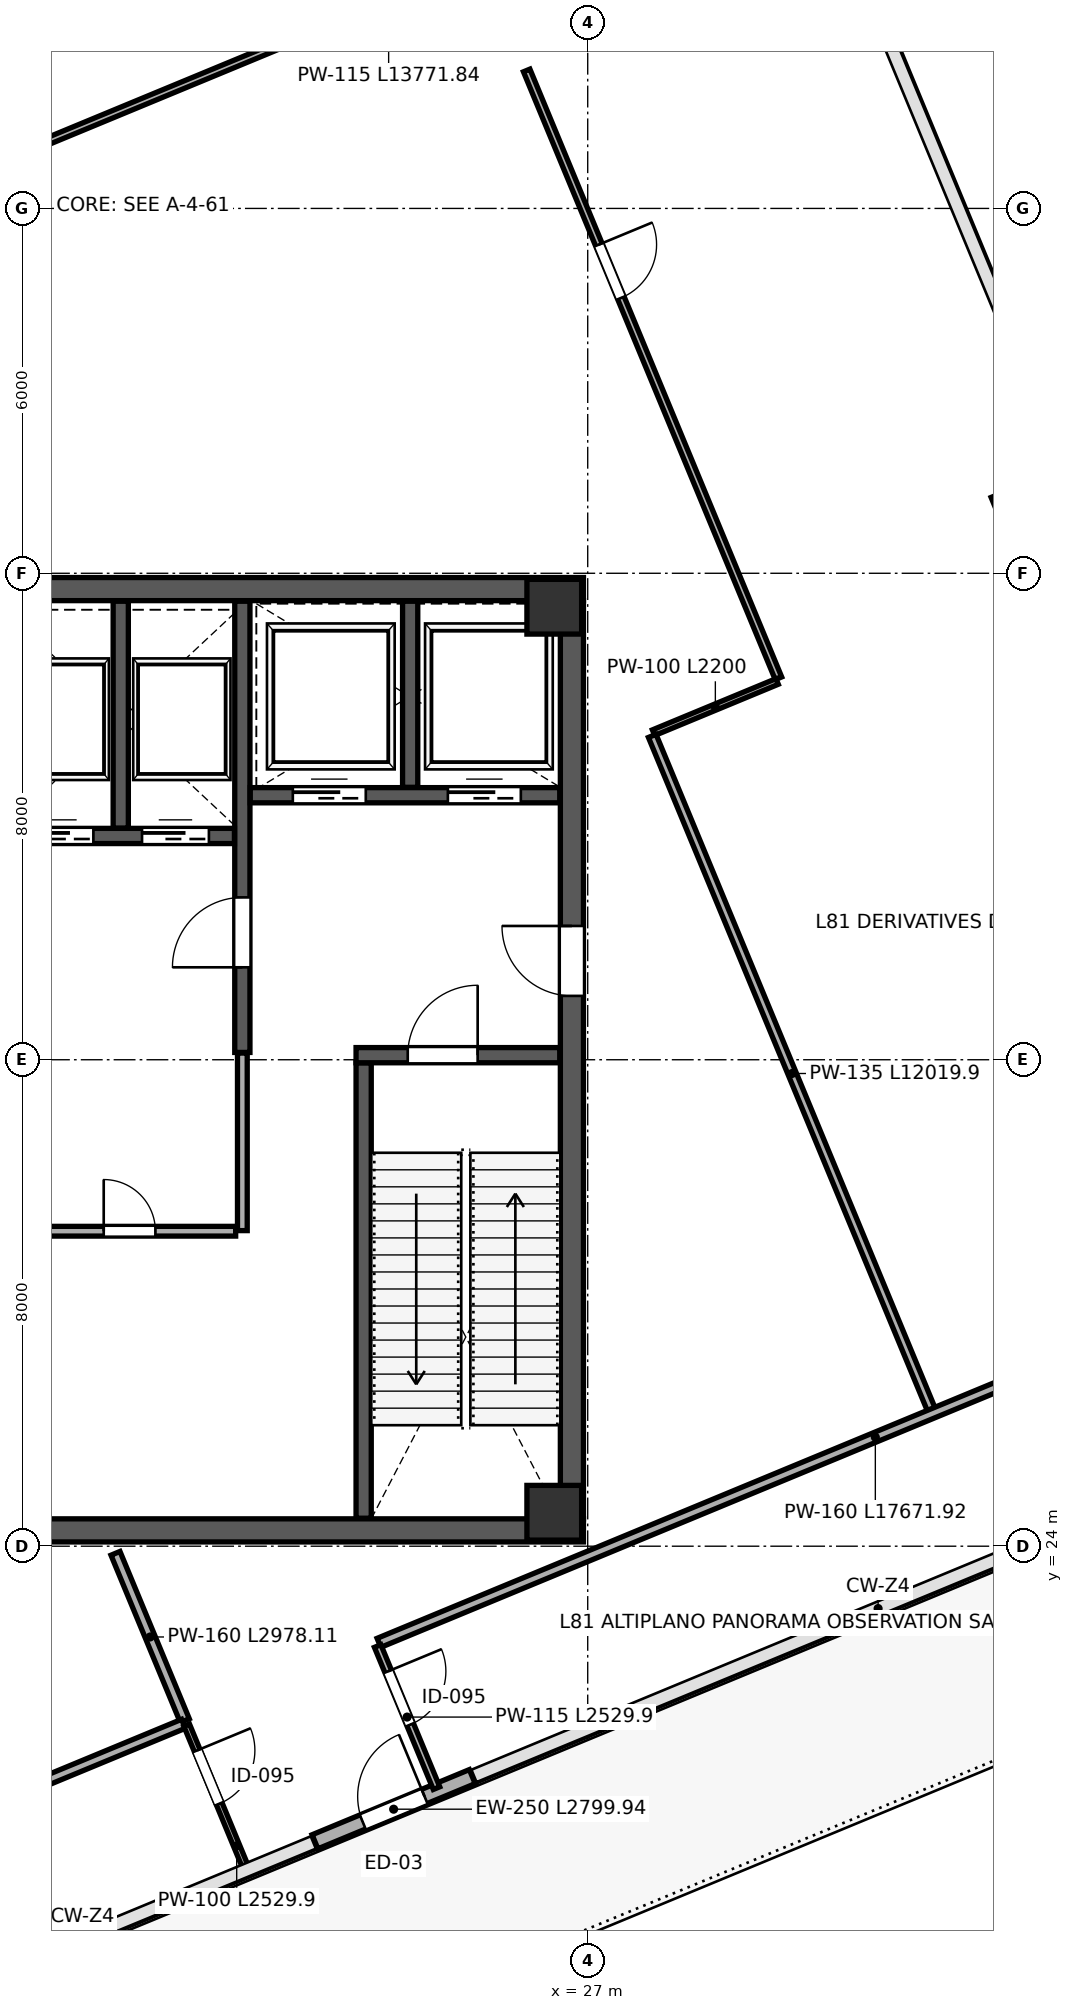
"""IFC4 building model, lengths in metres.
Left out: names, types, materials, properties, quantities, classifications, styles, units other than length and angle.
Written with IfcOpenShell. Run it as: python <this file> out.ifc"""

import sys

from ifc_helpers import new_model, si_unit, direction, frame, frame_2d, origin, origin_2d, place, context, subcontext, project, spatial, rectangle, extrude, source, transform, mapped, element, fill, save


model = new_model("IFC4")
c1 = context("Model", 3, precision=1e-05, world=origin(), true_north=direction((0.0, 1.0)))
c2 = subcontext(c1, "Body", "Model", "MODEL_VIEW")
j1 = project(units=[si_unit("LENGTHUNIT", "METRE"), si_unit("PLANEANGLEUNIT", "RADIAN")], contexts=[c1])
p1 = place(None, origin())
s1 = spatial("IfcSite", under=j1, at=p1, CompositionType="ELEMENT")
p2 = place(p1, origin())
s2 = spatial("IfcBuilding", under=s1, at=p2, CompositionType="ELEMENT")
p3 = place(p2, frame((0.0, 0.0, 360.0)))
s3 = spatial("IfcBuildingStorey", under=s2, at=p3, CompositionType="ELEMENT", Elevation=360.0)
m1 = source(origin(), c2, "Body", "SweptSolid", [
    extrude(rectangle(XDim=0.9, YDim=0.9, at=origin_2d()), origin(), (0.0, 0.0, 1.0), 5.999),
])
for number, where, z_axis, x_axis in (
    (1, (26.45, 24.55, 0.001), (0.0, 0.0, 1.0), (1.0, 0.0, 0.0)),
    (2, (26.45, 39.45, 0.001), (0.0, 0.0, 1.0), (1.0, 0.0, 0.0)),
):
    element("IfcColumn", number, at=place(p3, frame(where, z_axis=z_axis, x_axis=x_axis)), inside=s3, PredefinedType="COLUMN", context=c2, shape_type="MappedRepresentation", body=[
        mapped(m1, transform((0.0, 0.0, 0.0), scale=1.0)),
    ])
m2 = source(origin(), c2, "Body", "SweptSolid", [
    extrude(rectangle(XDim=0.8, YDim=0.8, at=origin_2d()), origin(), (0.0, 0.0, 1.0), 5.699),
])
p4 = place(p3, frame((34.157, 41.031, 0.001), z_axis=(0.0, 0.0, 1.0), x_axis=(-0.382683432365, 0.923879532511, 0.0)))
e3 = element("IfcColumn", 3, at=p4, inside=s3, PredefinedType="COLUMN", context=c2, shape_type="MappedRepresentation", body=[
    mapped(m2, transform((0.0, 0.0, 0.0), scale=1.0)),
])
p5 = place(p3, frame((22.515, 19.139, 0.0), z_axis=(0.0, 0.0, 1.0), x_axis=(0.92391057023, 0.382608492088, 0.0)))
e4 = element("IfcWall", 4, at=p5, inside=s3, PredefinedType="SOLIDWALL", context=c2, shape_type="SweptSolid", body=[
    extrude(rectangle(XDim=2.8, YDim=0.25, at=frame_2d((1.4, 0.0))), origin(), (0.0, 0.0, 1.0), 5.72),
])
p6 = place(p5, frame((0.85, 0.0, 0.0)))
e5 = element("IfcOpeningElement", 5, at=p6, cuts=e4, PredefinedType="OPENING", context=c2, shape_type="SweptSolid", body=[
    extrude(rectangle(XDim=1.1, YDim=2.2, at=frame_2d((0.55, 1.1))), frame((0.0, 0.135, 0.0), z_axis=(0.0, -1.0, 0.0), x_axis=(1.0, 0.0, 0.0)), (0.0, 0.0, 1.0), 0.27),
])
p7 = place(p3, frame((26.74, 24.45, 0.0), z_axis=(0.0, 0.0, 1.0), x_axis=(0.0, 1.0, 0.0)))
e6 = element("IfcWall", 6, at=p7, inside=s3, PredefinedType="SHEAR", context=c2, shape_type="SweptSolid", body=[
    extrude(rectangle(XDim=15.1, YDim=0.38, at=frame_2d((7.55, 0.0))), origin(), (0.0, 0.0, 1.0), 5.72),
])
p8 = place(p7, frame((8.6, 0.0, 0.0)))
e7 = element("IfcOpeningElement", 7, at=p8, cuts=e6, PredefinedType="OPENING", context=c2, shape_type="SweptSolid", body=[
    extrude(rectangle(XDim=1.15, YDim=2.2, at=frame_2d((0.575, 1.1))), frame((0.0, 0.2, 0.0), z_axis=(0.0, -1.0, 0.0), x_axis=(1.0, 0.0, 0.0)), (0.0, 0.0, 1.0), 0.4),
])
for number, where, z_axis, x_axis in (
    (8, (9.07, 24.26, 0.0), (0.0, 0.0, 1.0), (1.0, 0.0, 0.0)),
    (9, (9.07, 39.74, 0.0), (0.0, 0.0, 1.0), (1.0, 0.0, 0.0)),
):
    element("IfcWall", number, at=place(p3, frame(where, z_axis=z_axis, x_axis=x_axis)), inside=s3, PredefinedType="SHEAR", context=c2, shape_type="SweptSolid", body=[
        extrude(rectangle(XDim=17.86, YDim=0.38, at=frame_2d((8.93, 0.0))), origin(), (0.0, 0.0, 1.0), 5.72),
    ])
p9 = place(p3, frame((23.315, 24.46, 0.0), z_axis=(0.0, 0.0, 1.0), x_axis=(0.0, 1.0, 0.0)))
e10 = element("IfcWall", 10, at=p9, inside=s3, PredefinedType="SHEAR", context=c2, shape_type="SweptSolid", body=[
    extrude(rectangle(XDim=7.49, YDim=0.25, at=frame_2d((3.745, 0.0))), origin(), (0.0, 0.0, 1.0), 5.72),
])
p10 = place(p3, frame((23.19, 32.075, 0.0), z_axis=(0.0, 0.0, 1.0), x_axis=(1.0, 0.0, 0.0)))
e11 = element("IfcWall", 11, at=p10, inside=s3, PredefinedType="SHEAR", context=c2, shape_type="SweptSolid", body=[
    extrude(rectangle(XDim=3.35, YDim=0.25, at=frame_2d((1.675, 0.0))), origin(), (0.0, 0.0, 1.0), 5.72),
])
p11 = place(p10, frame((0.85, 0.0, 0.0)))
e12 = element("IfcOpeningElement", 12, at=p11, cuts=e11, PredefinedType="OPENING", context=c2, shape_type="SweptSolid", body=[
    extrude(rectangle(XDim=1.15, YDim=2.2, at=frame_2d((0.575, 1.1))), frame((0.0, 0.135, 0.0), z_axis=(0.0, -1.0, 0.0), x_axis=(1.0, 0.0, 0.0)), (0.0, 0.0, 1.0), 0.27),
])
p12 = place(p3, frame((21.32, 32.12, 0.0), z_axis=(0.0, 0.0, 1.0), x_axis=(0.0, 1.0, 0.0)))
e13 = element("IfcWall", 13, at=p12, inside=s3, PredefinedType="SHEAR", context=c2, shape_type="SweptSolid", body=[
    extrude(rectangle(XDim=7.42, YDim=0.25, at=frame_2d((3.71, 0.0))), origin(), (0.0, 0.0, 1.0), 5.72),
])
p13 = place(p12, frame((1.4, 0.0, 0.0)))
e14 = element("IfcOpeningElement", 14, at=p13, cuts=e13, PredefinedType="OPENING", context=c2, shape_type="SweptSolid", body=[
    extrude(rectangle(XDim=1.15, YDim=2.2, at=frame_2d((0.575, 1.1))), frame((0.0, 0.135, 0.0), z_axis=(0.0, -1.0, 0.0), x_axis=(1.0, 0.0, 0.0)), (0.0, 0.0, 1.0), 0.27),
])
p14 = place(p3, frame((21.45, 36.35, 0.0), z_axis=(0.0, 0.0, 1.0), x_axis=(1.0, 0.0, 0.0)))
e15 = element("IfcWall", 15, at=p14, inside=s3, PredefinedType="SHEAR", context=c2, shape_type="SweptSolid", body=[
    extrude(rectangle(XDim=5.09, YDim=0.25, at=frame_2d((2.545, 0.0))), origin(), (0.0, 0.0, 1.0), 5.72),
])
p15 = place(p14, frame((0.7, 0.0, 0.0)))
e16 = element("IfcOpeningElement", 16, at=p15, cuts=e15, PredefinedType="OPENING", context=c2, shape_type="SweptSolid", body=[
    extrude(rectangle(XDim=1.2, YDim=2.2, at=frame_2d((0.6, 1.1))), frame((0.0, 0.135, 0.0), z_axis=(0.0, -1.0, 0.0), x_axis=(1.0, 0.0, 0.0)), (0.0, 0.0, 1.0), 0.27),
])
p16 = place(p14, frame((3.25, 0.0, 0.0)))
e17 = element("IfcOpeningElement", 17, at=p16, cuts=e15, PredefinedType="OPENING", context=c2, shape_type="SweptSolid", body=[
    extrude(rectangle(XDim=1.2, YDim=2.2, at=frame_2d((0.6, 1.1))), frame((0.0, 0.135, 0.0), z_axis=(0.0, -1.0, 0.0), x_axis=(1.0, 0.0, 0.0)), (0.0, 0.0, 1.0), 0.27),
])
p17 = place(p3, frame((24.08, 36.48, 0.0), z_axis=(0.0, 0.0, 1.0), x_axis=(0.0, 1.0, 0.0)))
e18 = element("IfcWall", 18, at=p17, inside=s3, PredefinedType="SHEAR", context=c2, shape_type="SweptSolid", body=[
    extrude(rectangle(XDim=3.06, YDim=0.25, at=frame_2d((1.53, 0.0))), origin(), (0.0, 0.0, 1.0), 5.72),
])
p18 = place(p3, frame((17.32, 35.68, 0.0), z_axis=(0.0, 0.0, 1.0), x_axis=(1.0, 0.0, 0.0)))
e19 = element("IfcWall", 19, at=p18, inside=s3, PredefinedType="SHEAR", context=c2, shape_type="SweptSolid", body=[
    extrude(rectangle(XDim=3.87, YDim=0.25, at=frame_2d((1.935, 0.0))), origin(), (0.0, 0.0, 1.0), 5.72),
])
p19 = place(p18, frame((0.45, 0.0, 0.0)))
e20 = element("IfcOpeningElement", 20, at=p19, cuts=e19, PredefinedType="OPENING", context=c2, shape_type="SweptSolid", body=[
    extrude(rectangle(XDim=1.1, YDim=2.2, at=frame_2d((0.55, 1.1))), frame((0.0, 0.135, 0.0), z_axis=(0.0, -1.0, 0.0), x_axis=(1.0, 0.0, 0.0)), (0.0, 0.0, 1.0), 0.27),
])
p20 = place(p18, frame((2.35, 0.0, 0.0)))
e21 = element("IfcOpeningElement", 21, at=p20, cuts=e19, PredefinedType="OPENING", context=c2, shape_type="SweptSolid", body=[
    extrude(rectangle(XDim=1.1, YDim=2.2, at=frame_2d((0.55, 1.1))), frame((0.0, 0.135, 0.0), z_axis=(0.0, -1.0, 0.0), x_axis=(1.0, 0.0, 0.0)), (0.0, 0.0, 1.0), 0.27),
])
p21 = place(p3, frame((19.32, 35.81, 0.0), z_axis=(0.0, 0.0, 1.0), x_axis=(0.0, 1.0, 0.0)))
e22 = element("IfcWall", 22, at=p21, inside=s3, PredefinedType="SHEAR", context=c2, shape_type="SweptSolid", body=[
    extrude(rectangle(XDim=3.73, YDim=0.25, at=frame_2d((1.865, 0.0))), origin(), (0.0, 0.0, 1.0), 5.72),
])
p22 = place(p3, frame((12.84, 29.18, 0.0), z_axis=(0.0, 0.0, 1.0), x_axis=(1.0, 0.0, 0.0)))
e23 = element("IfcWall", 23, at=p22, inside=s3, PredefinedType="PARTITIONING", context=c2, shape_type="SweptSolid", body=[
    extrude(rectangle(XDim=8.37, YDim=0.16, at=frame_2d((4.185, 0.0))), origin(), (0.0, 0.0, 1.0), 5.72),
])
p23 = place(p22, frame((2.1, 0.0, 0.0)))
e24 = element("IfcOpeningElement", 24, at=p23, cuts=e23, PredefinedType="OPENING", context=c2, shape_type="SweptSolid", body=[
    extrude(rectangle(XDim=0.9, YDim=2.15, at=frame_2d((0.45, 1.075))), frame((0.0, 0.09, 0.0), z_axis=(0.0, -1.0, 0.0), x_axis=(1.0, 0.0, 0.0)), (0.0, 0.0, 1.0), 0.18),
])
p24 = place(p22, frame((6.2, 0.0, 0.0)))
e25 = element("IfcOpeningElement", 25, at=p24, cuts=e23, PredefinedType="OPENING", context=c2, shape_type="SweptSolid", body=[
    extrude(rectangle(XDim=0.85, YDim=2.1, at=frame_2d((0.425, 1.05))), frame((0.0, 0.09, 0.0), z_axis=(0.0, -1.0, 0.0), x_axis=(1.0, 0.0, 0.0)), (0.0, 0.0, 1.0), 0.18),
])
p25 = place(p3, frame((21.32, 29.19, 0.0), z_axis=(0.0, 0.0, 1.0), x_axis=(0.0, 1.0, 0.0)))
e26 = element("IfcWall", 26, at=p25, inside=s3, PredefinedType="PARTITIONING", context=c2, shape_type="SweptSolid", body=[
    extrude(rectangle(XDim=2.92, YDim=0.16, at=frame_2d((1.46, 0.0))), origin(), (0.0, 0.0, 1.0), 5.72),
])
p26 = place(p3, frame((19.234, 23.883, 0.0), z_axis=(0.0, 0.0, 1.0), x_axis=(0.382670358191, -0.923884947903, 0.0)))
e27 = element("IfcWall", 27, at=p26, inside=s3, PredefinedType="PARTITIONING", context=c2, shape_type="SweptSolid", body=[
    extrude(rectangle(XDim=2.978, YDim=0.16, at=frame_2d((1.489, 0.0))), origin(), (0.0, 0.0, 1.0), 5.72),
])
p27 = place(p3, frame((25.996, 48.269, 0.0), z_axis=(0.0, 0.0, 1.0), x_axis=(0.382683927115, -0.923879327579, 0.0)))
e28 = element("IfcWall", 28, at=p27, inside=s3, PredefinedType="PARTITIONING", context=c2, shape_type="SweptSolid", body=[
    extrude(rectangle(XDim=10.82, YDim=0.115, at=frame_2d((5.41, 0.0))), origin(), (0.0, 0.0, 1.0), 5.72),
])
p28 = place(p27, frame((3.1, 0.0, 0.0)))
e29 = element("IfcOpeningElement", 29, at=p28, cuts=e28, PredefinedType="OPENING", context=c2, shape_type="SweptSolid", body=[
    extrude(rectangle(XDim=0.95, YDim=2.15, at=frame_2d((0.475, 1.075))), frame((0.0, 0.067, 0.0), z_axis=(0.0, -1.0, 0.0), x_axis=(1.0, 0.0, 0.0)), (0.0, 0.0, 1.0), 0.135),
])
p29 = place(p3, frame((28.083, 37.378, 0.0), z_axis=(0.0, 0.0, 1.0), x_axis=(0.923853160736, 0.382747093259, 0.0)))
e30 = element("IfcWall", 30, at=p29, inside=s3, PredefinedType="PARTITIONING", context=c2, shape_type="SweptSolid", body=[
    extrude(rectangle(XDim=2.2, YDim=0.1, at=frame_2d((1.1, 0.0))), origin(), (0.0, 0.0, 1.0), 5.72),
])
p30 = place(p3, frame((28.061, 37.326, 0.0), z_axis=(0.0, 0.0, 1.0), x_axis=(0.382684852278, -0.923878944363, 0.0)))
e31 = element("IfcWall", 31, at=p30, inside=s3, PredefinedType="PARTITIONING", context=c2, shape_type="SweptSolid", body=[
    extrude(rectangle(XDim=12.02, YDim=0.135, at=frame_2d((6.01, 0.0))), origin(), (0.0, 0.0, 1.0), 5.72),
])
p31 = place(p3, frame((17.364, 46.793, 0.0), z_axis=(0.0, 0.0, 1.0), x_axis=(0.923874230192, 0.382696233045, 0.0)))
e32 = element("IfcWall", 32, at=p31, inside=s3, PredefinedType="PARTITIONING", context=c2, shape_type="SweptSolid", body=[
    extrude(rectangle(XDim=13.772, YDim=0.115, at=frame_2d((6.886, 0.0))), origin(), (0.0, 0.0, 1.0), 5.72),
])
p32 = place(p3, frame((23.567, 22.411, 0.0), z_axis=(0.0, 0.0, 1.0), x_axis=(0.923875223291, 0.382693835577, 0.0)))
e33 = element("IfcWall", 33, at=p32, inside=s3, PredefinedType="PARTITIONING", context=c2, shape_type="SweptSolid", body=[
    extrude(rectangle(XDim=17.672, YDim=0.16, at=frame_2d((8.836, 0.0))), origin(), (0.0, 0.0, 1.0), 5.72),
])
p33 = place(p3, frame((11.416, 17.378, 0.0), z_axis=(0.0, 0.0, 1.0), x_axis=(0.923876235796, 0.382691391243, 0.0)))
e34 = element("IfcWall", 34, at=p33, inside=s3, PredefinedType="PARTITIONING", context=c2, shape_type="SweptSolid", body=[
    extrude(rectangle(XDim=9.672, YDim=0.16, at=frame_2d((4.836, 0.0))), origin(), (0.0, 0.0, 1.0), 5.72),
])
p34 = place(p3, frame((23.545, 22.359, 0.0), z_axis=(0.0, 0.0, 1.0), x_axis=(0.382743857879, -0.923854501129, 0.0)))
e35 = element("IfcWall", 35, at=p34, inside=s3, PredefinedType="PARTITIONING", context=c2, shape_type="SweptSolid", body=[
    extrude(rectangle(XDim=2.53, YDim=0.115, at=frame_2d((1.265, 0.0))), origin(), (0.0, 0.0, 1.0), 5.72),
])
p35 = place(p34, frame((0.45, 0.0, 0.0)))
e36 = element("IfcOpeningElement", 36, at=p35, cuts=e35, PredefinedType="OPENING", context=c2, shape_type="SweptSolid", body=[
    extrude(rectangle(XDim=0.95, YDim=2.15, at=frame_2d((0.475, 1.075))), frame((0.0, 0.067, 0.0), z_axis=(0.0, -1.0, 0.0), x_axis=(1.0, 0.0, 0.0)), (0.0, 0.0, 1.0), 0.135),
])
p36 = place(p3, frame((20.404, 21.058, 0.0), z_axis=(0.0, 0.0, 1.0), x_axis=(0.382709736079, -0.923868636717, 0.0)))
e37 = element("IfcWall", 37, at=p36, inside=s3, PredefinedType="PARTITIONING", context=c2, shape_type="SweptSolid", body=[
    extrude(rectangle(XDim=2.53, YDim=0.1, at=frame_2d((1.265, 0.0))), origin(), (0.0, 0.0, 1.0), 5.72),
])
p37 = place(p36, frame((0.45, 0.0, 0.0)))
e38 = element("IfcOpeningElement", 38, at=p37, cuts=e37, PredefinedType="OPENING", context=c2, shape_type="SweptSolid", body=[
    extrude(rectangle(XDim=0.95, YDim=2.15, at=frame_2d((0.475, 1.075))), frame((0.0, 0.06, 0.0), z_axis=(0.0, -1.0, 0.0), x_axis=(1.0, 0.0, 0.0)), (0.0, 0.0, 1.0), 0.12),
])
m3 = source(origin(), c2, "Body", "SweptSolid", [
    extrude(rectangle(XDim=1.1, YDim=2.2, at=frame_2d((0.55, 1.1))), frame((0.0, 0.025, 0.0), z_axis=(0.0, -1.0, 0.0), x_axis=(1.0, 0.0, 0.0)), (0.0, 0.0, 1.0), 0.05),
])
p38 = place(p6, origin())
e39 = element("IfcDoor", 39, at=p38, inside=s3, OperationType="SINGLE_SWING_RIGHT", PredefinedType="DOOR", context=c2, shape_type="MappedRepresentation", body=[
    mapped(m3, transform((0.0, 0.0, 0.0), scale=1.0)),
])
fill(e5, e39)
m4 = source(origin(), c2, "Body", "SweptSolid", [
    extrude(rectangle(XDim=1.15, YDim=2.2, at=frame_2d((0.575, 1.1))), frame((0.0, 0.025, 0.0), z_axis=(0.0, -1.0, 0.0), x_axis=(1.0, 0.0, 0.0)), (0.0, 0.0, 1.0), 0.05),
])
p39 = place(p13, origin())
e40 = element("IfcDoor", 40, at=p39, inside=s3, OperationType="SINGLE_SWING_LEFT", PredefinedType="DOOR", context=c2, shape_type="MappedRepresentation", body=[
    mapped(m4, transform((0.0, 0.0, 0.0), scale=1.0)),
])
fill(e14, e40)
m5 = source(origin(), c2, "Body", "SweptSolid", [
    extrude(rectangle(XDim=1.15, YDim=2.2, at=frame_2d((0.575, 1.1))), frame((0.0, 0.025, 0.0), z_axis=(0.0, -1.0, 0.0), x_axis=(1.0, 0.0, 0.0)), (0.0, 0.0, 1.0), 0.05),
])
p40 = place(p11, origin())
e41 = element("IfcDoor", 41, at=p40, inside=s3, OperationType="SINGLE_SWING_RIGHT", PredefinedType="DOOR", context=c2, shape_type="MappedRepresentation", body=[
    mapped(m5, transform((0.0, 0.0, 0.0), scale=1.0)),
])
fill(e12, e41)
p41 = place(p8, origin())
e42 = element("IfcDoor", 42, at=p41, inside=s3, OperationType="SINGLE_SWING_RIGHT", PredefinedType="DOOR", context=c2, shape_type="MappedRepresentation", body=[
    mapped(m4, transform((0.0, 0.0, 0.0), scale=1.0)),
])
fill(e7, e42)
m6 = source(origin(), c2, "Body", "SweptSolid", [
    extrude(rectangle(XDim=1.1, YDim=2.2, at=frame_2d((0.55, 1.1))), frame((0.0, 0.025, 0.0), z_axis=(0.0, -1.0, 0.0), x_axis=(1.0, 0.0, 0.0)), (0.0, 0.0, 1.0), 0.05),
])
p42 = place(p19, origin())
e43 = element("IfcDoor", 43, at=p42, inside=s3, OperationType="SLIDING_TO_LEFT", PredefinedType="DOOR", context=c2, shape_type="MappedRepresentation", body=[
    mapped(m6, transform((0.0, 0.0, 0.0), scale=1.0)),
])
fill(e20, e43)
p43 = place(p20, origin())
e44 = element("IfcDoor", 44, at=p43, inside=s3, OperationType="SLIDING_TO_RIGHT", PredefinedType="DOOR", context=c2, shape_type="MappedRepresentation", body=[
    mapped(m6, transform((0.0, 0.0, 0.0), scale=1.0)),
])
fill(e21, e44)
m7 = source(origin(), c2, "Body", "SweptSolid", [
    extrude(rectangle(XDim=1.2, YDim=2.2, at=frame_2d((0.6, 1.1))), frame((0.0, 0.025, 0.0), z_axis=(0.0, -1.0, 0.0), x_axis=(1.0, 0.0, 0.0)), (0.0, 0.0, 1.0), 0.05),
])
p44 = place(p15, origin())
e45 = element("IfcDoor", 45, at=p44, inside=s3, OperationType="SLIDING_TO_LEFT", PredefinedType="DOOR", context=c2, shape_type="MappedRepresentation", body=[
    mapped(m7, transform((0.0, 0.0, 0.0), scale=1.0)),
])
fill(e16, e45)
p45 = place(p16, origin())
e46 = element("IfcDoor", 46, at=p45, inside=s3, OperationType="SLIDING_TO_RIGHT", PredefinedType="DOOR", context=c2, shape_type="MappedRepresentation", body=[
    mapped(m7, transform((0.0, 0.0, 0.0), scale=1.0)),
])
fill(e17, e46)
m8 = source(origin(), c2, "Body", "SweptSolid", [
    extrude(rectangle(XDim=0.85, YDim=2.1, at=frame_2d((0.425, 1.05))), frame((0.0, 0.025, 0.0), z_axis=(0.0, -1.0, 0.0), x_axis=(1.0, 0.0, 0.0)), (0.0, 0.0, 1.0), 0.05),
])
p46 = place(p24, origin())
e47 = element("IfcDoor", 47, at=p46, inside=s3, OperationType="SINGLE_SWING_LEFT", PredefinedType="DOOR", context=c2, shape_type="MappedRepresentation", body=[
    mapped(m8, transform((0.0, 0.0, 0.0), scale=1.0)),
])
fill(e25, e47)
m9 = source(origin(), c2, "Body", "SweptSolid", [
    extrude(rectangle(XDim=0.95, YDim=2.15, at=frame_2d((0.475, 1.075))), frame((0.0, 0.025, 0.0), z_axis=(0.0, -1.0, 0.0), x_axis=(1.0, 0.0, 0.0)), (0.0, 0.0, 1.0), 0.05),
])
p47 = place(p28, origin())
e48 = element("IfcDoor", 48, at=p47, inside=s3, OperationType="SINGLE_SWING_LEFT", PredefinedType="DOOR", context=c2, shape_type="MappedRepresentation", body=[
    mapped(m9, transform((0.0, 0.0, 0.0), scale=1.0)),
])
fill(e29, e48)
p48 = place(p35, origin())
e49 = element("IfcDoor", 49, at=p48, inside=s3, OperationType="SINGLE_SWING_LEFT", PredefinedType="DOOR", context=c2, shape_type="MappedRepresentation", body=[
    mapped(m9, transform((0.0, 0.0, 0.0), scale=1.0)),
])
fill(e36, e49)
p49 = place(p37, origin())
e50 = element("IfcDoor", 50, at=p49, inside=s3, OperationType="SINGLE_SWING_LEFT", PredefinedType="DOOR", context=c2, shape_type="MappedRepresentation", body=[
    mapped(m9, transform((0.0, 0.0, 0.0), scale=1.0)),
])
fill(e38, e50)
save(model, sys.argv[1])
